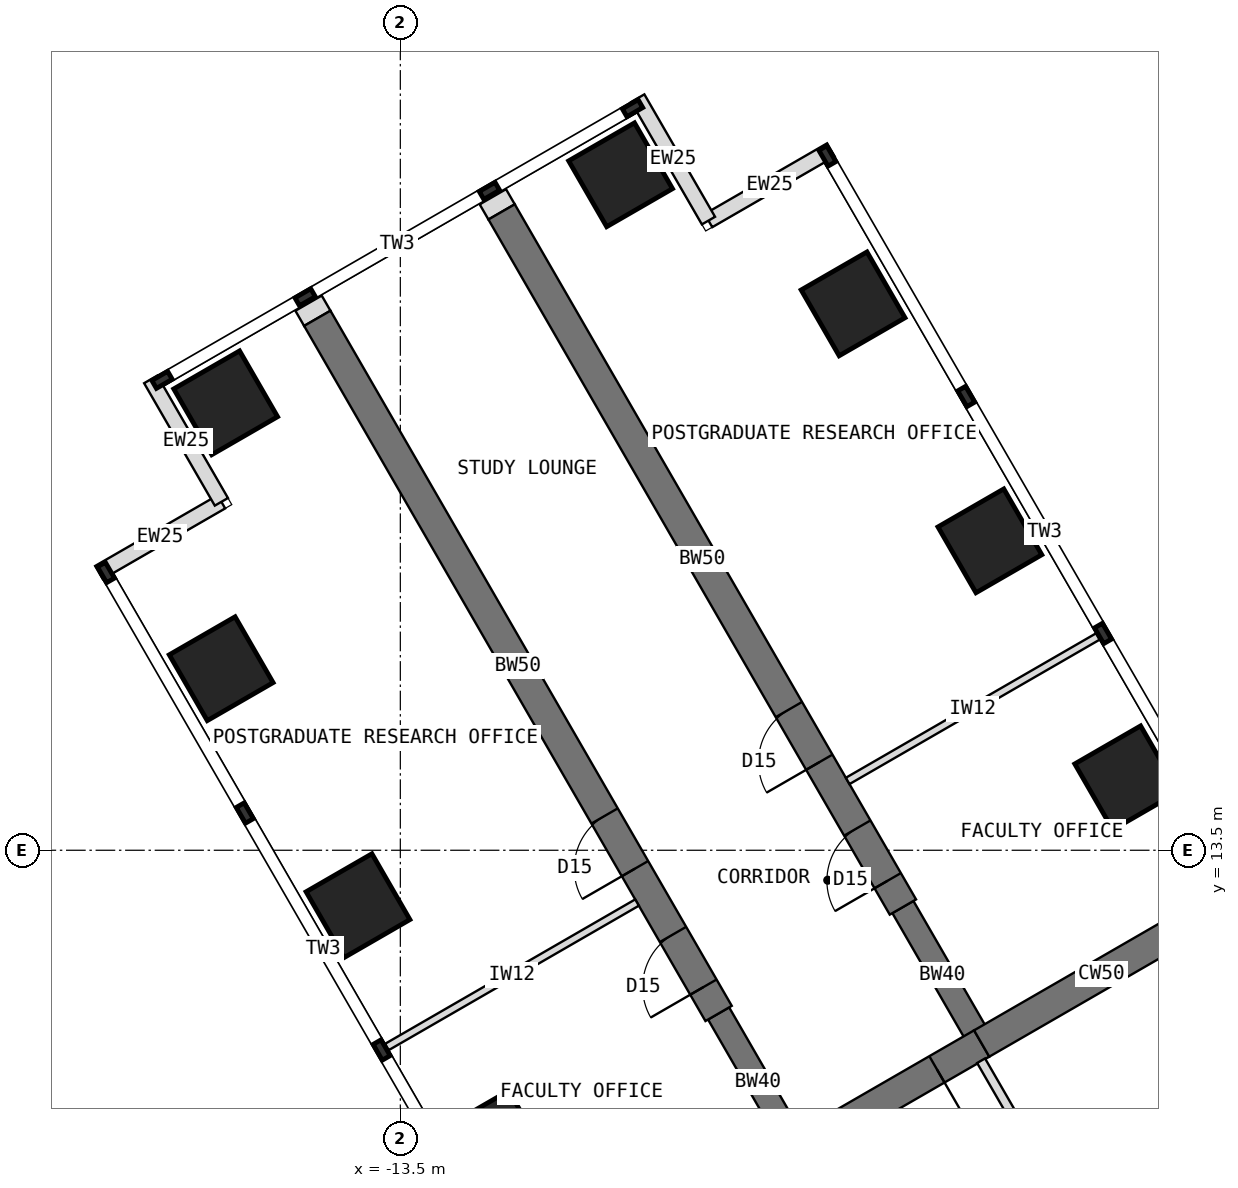
"""IFC4 building model, lengths in metres.
Left out: names, types, materials, properties, quantities, classifications, styles, units other than length and angle.
Written with IfcOpenShell. Run it as: python <this file> out.ifc"""

import sys

from ifc_helpers import new_model, si_unit, direction, frame, frame_2d, origin, origin_2d, place, context, subcontext, project, spatial, rectangle, extrude, element, fill, save


model = new_model("IFC4")
c1 = context("Model", 3, precision=1e-05, world=origin(), true_north=direction((0.0, 1.0)))
c2 = subcontext(c1, "Body", "Model", "MODEL_VIEW")
j1 = project(units=[si_unit("LENGTHUNIT", "METRE"), si_unit("PLANEANGLEUNIT", "RADIAN")], contexts=[c1])
p1 = place(None, origin())
s1 = spatial("IfcSite", under=j1, at=p1, CompositionType="ELEMENT")
p2 = place(p1, origin())
s2 = spatial("IfcBuilding", under=s1, at=p2, CompositionType="ELEMENT")
p3 = place(p2, frame((0.0, 0.0, 170.5)))
s3 = spatial("IfcBuildingStorey", under=s2, at=p3, CompositionType="ELEMENT", Elevation=170.5)
p4 = place(p3, frame((0.0, 12.596, 0.0), z_axis=(0.0, 0.0, 1.0), x_axis=(-0.866011268655, -0.500024481964, 0.0)))
e1 = element("IfcWall", 1, at=p4, inside=s3, PredefinedType="SHEAR", context=c2, shape_type="SweptSolid", body=[
    extrude(rectangle(XDim=4.548, YDim=0.5, at=frame_2d((2.274, 0.0))), origin(), (0.0, 0.0, 1.0), 4.0),
])
p5 = place(p3, frame((-3.939, 10.322, 0.0), z_axis=(0.0, 0.0, 1.0), x_axis=(-0.866019471182, -0.500010275428, 0.0)))
e2 = element("IfcWall", 2, at=p5, inside=s3, PredefinedType="SHEAR", context=c2, shape_type="SweptSolid", body=[
    extrude(rectangle(XDim=3.5, YDim=0.5, at=frame_2d((1.75, 0.0))), origin(), (0.0, 0.0, 1.0), 4.0),
])
p6 = place(p5, frame((0.85, 0.0, 0.0)))
e3 = element("IfcOpeningElement", 3, at=p6, cuts=e2, PredefinedType="OPENING", context=c2, shape_type="SweptSolid", body=[
    extrude(rectangle(XDim=1.8, YDim=2.1, at=frame_2d((0.9, 1.05))), frame((0.0, 0.26, 0.0), z_axis=(0.0, -1.0, 0.0), x_axis=(1.0, 0.0, 0.0)), (0.0, 0.0, 1.0), 0.52),
])
p7 = place(p3, frame((-6.97, 8.572, 0.0), z_axis=(0.0, 0.0, 1.0), x_axis=(-0.499988811324, 0.866031863473, 0.0)))
e4 = element("IfcWall", 4, at=p7, inside=s3, PredefinedType="SHEAR", context=c2, shape_type="SweptSolid", body=[
    extrude(rectangle(XDim=2.592, YDim=0.4, at=frame_2d((1.296, 0.0))), origin(), (0.0, 0.0, 1.0), 4.0),
])
p8 = place(p3, frame((-8.266, 10.816, 0.0), z_axis=(0.0, 0.0, 1.0), x_axis=(-0.499996231654, 0.866027579429, 0.0)))
e5 = element("IfcWall", 5, at=p8, inside=s3, PredefinedType="SHEAR", context=c2, shape_type="SweptSolid", body=[
    extrude(rectangle(XDim=13.2, YDim=0.5, at=frame_2d((6.6, 0.0))), origin(), (0.0, 0.0, 1.0), 4.0),
])
p9 = place(p8, frame((0.5, 0.0, 0.0)))
e6 = element("IfcOpeningElement", 6, at=p9, cuts=e5, PredefinedType="OPENING", context=c2, shape_type="SweptSolid", body=[
    extrude(rectangle(XDim=1.0, YDim=2.1, at=frame_2d((0.5, 1.05))), frame((0.0, 0.26, 0.0), z_axis=(0.0, -1.0, 0.0), x_axis=(1.0, 0.0, 0.0)), (0.0, 0.0, 1.0), 0.52),
])
p10 = place(p8, frame((2.75, 0.0, 0.0)))
e7 = element("IfcOpeningElement", 7, at=p10, cuts=e5, PredefinedType="OPENING", context=c2, shape_type="SweptSolid", body=[
    extrude(rectangle(XDim=1.0, YDim=2.1, at=frame_2d((0.5, 1.05))), frame((0.0, 0.26, 0.0), z_axis=(0.0, -1.0, 0.0), x_axis=(1.0, 0.0, 0.0)), (0.0, 0.0, 1.0), 0.52),
])
p11 = place(p3, frame((-3.939, 10.322, 0.0), z_axis=(0.0, 0.0, 1.0), x_axis=(-0.499918158782, 0.866072649678, 0.0)))
e8 = element("IfcWall", 8, at=p11, inside=s3, PredefinedType="SHEAR", context=c2, shape_type="SweptSolid", body=[
    extrude(rectangle(XDim=2.592, YDim=0.4, at=frame_2d((1.296, 0.0))), origin(), (0.0, 0.0, 1.0), 4.0),
])
p12 = place(p3, frame((-5.234, 12.566, 0.0), z_axis=(0.0, 0.0, 1.0), x_axis=(-0.500010103361, 0.866019570528, 0.0)))
e9 = element("IfcWall", 9, at=p12, inside=s3, PredefinedType="SHEAR", context=c2, shape_type="SweptSolid", body=[
    extrude(rectangle(XDim=13.2, YDim=0.5, at=frame_2d((6.6, 0.0))), origin(), (0.0, 0.0, 1.0), 4.0),
])
p13 = place(p12, frame((0.5, 0.0, 0.0)))
e10 = element("IfcOpeningElement", 10, at=p13, cuts=e9, PredefinedType="OPENING", context=c2, shape_type="SweptSolid", body=[
    extrude(rectangle(XDim=1.0, YDim=2.1, at=frame_2d((0.5, 1.05))), frame((0.0, 0.26, 0.0), z_axis=(0.0, -1.0, 0.0), x_axis=(1.0, 0.0, 0.0)), (0.0, 0.0, 1.0), 0.52),
])
p14 = place(p12, frame((2.75, 0.0, 0.0)))
e11 = element("IfcOpeningElement", 11, at=p14, cuts=e9, PredefinedType="OPENING", context=c2, shape_type="SweptSolid", body=[
    extrude(rectangle(XDim=1.0, YDim=2.1, at=frame_2d((0.5, 1.05))), frame((0.0, 0.26, 0.0), z_axis=(0.0, -1.0, 0.0), x_axis=(1.0, 0.0, 0.0)), (0.0, 0.0, 1.0), 0.52),
])
for number, where, z_axis, x_axis in (
    (12, (-11.946, 8.691, 0.0), (0.0, 0.0, 1.0), (0.866, 0.5, 0.0)),
    (13, (-1.554, 14.691, 0.0), (0.0, 0.0, 1.0), (0.866, 0.5, 0.0)),
    (14, (-14.196, 12.588, 0.0), (0.0, 0.0, 1.0), (0.866, 0.5, 0.0)),
    (15, (-3.804, 18.588, 0.0), (0.0, 0.0, 1.0), (0.866, 0.5, 0.0)),
    (16, (-16.446, 16.486, 0.0), (0.0, 0.0, 1.0), (0.866, 0.5, 0.0)),
    (17, (-6.054, 22.486, 0.0), (0.0, 0.0, 1.0), (0.866, 0.5, 0.0)),
    (18, (-16.373, 20.858, 0.0), (0.0, 0.0, 1.0), (0.866, 0.5, 0.0)),
    (19, (-9.877, 24.608, 0.0), (0.0, 0.0, 1.0), (0.866, 0.5, 0.0)),
):
    element("IfcColumn", number, at=place(p3, frame(where, z_axis=z_axis, x_axis=x_axis)), inside=s3, PredefinedType="COLUMN", context=c2, shape_type="SweptSolid", body=[
        extrude(rectangle(XDim=1.25, YDim=1.25, at=origin_2d()), origin(), (0.0, 0.0, 1.0), 4.0),
    ])
for number, where, z_axis, x_axis in (
    (20, (-18.456, 18.067, 0.0), (0.0, 0.0, 1.0), (0.866, 0.5, 0.0)),
    (21, (-16.443, 19.23, 0.0), (0.0, 0.0, 1.0), (-0.5, 0.866, 0.0)),
    (22, (-6.419, 25.017, 0.0), (0.0, 0.0, 1.0), (-0.866, -0.5, 0.0)),
    (23, (-8.432, 23.855, 0.0), (0.0, 0.0, 1.0), (-0.5, 0.866, 0.0)),
):
    element("IfcWall", number, at=place(p3, frame(where, z_axis=z_axis, x_axis=x_axis)), inside=s3, PredefinedType="STANDARD", context=c2, shape_type="SweptSolid", body=[
        extrude(rectangle(XDim=2.325, YDim=0.25, at=frame_2d((1.163, 0.0))), origin(), (0.0, 0.0, 1.0), 3.8),
    ])
for number, where, z_axis, x_axis in (
    (24, (-14.865, 22.248, 0.0), (0.0, 0.0, 1.0), (-0.5, 0.866, 0.0)),
    (25, (-11.834, 23.998, 0.0), (0.0, 0.0, 1.0), (-0.5, 0.866, 0.0)),
):
    element("IfcWall", number, at=place(p3, frame(where, z_axis=z_axis, x_axis=x_axis)), inside=s3, PredefinedType="PARTITIONING", context=c2, shape_type="SweptSolid", body=[
        extrude(rectangle(XDim=0.288, YDim=0.5, at=frame_2d((0.144, 0.0))), origin(), (0.0, 0.0, 1.0), 3.8),
    ])
p15 = place(p3, frame((-1.201, 6.12, 0.0), z_axis=(0.0, 0.0, 1.0), x_axis=(0.500021575205, 0.866012946976, 0.0)))
e26 = element("IfcWall", 26, at=p15, inside=s3, PredefinedType="SHEAR", context=c2, shape_type="SweptSolid", body=[
    extrude(rectangle(XDim=5.958, YDim=0.4, at=frame_2d((2.979, 0.0))), origin(), (0.0, 0.0, 1.0), 4.0),
])
for number, where, z_axis, x_axis in (
    (27, (-9.607, 12.64, 0.0), (0.0, 0.0, 1.0), (-0.866, -0.5, 0.0)),
    (28, (-6.143, 14.64, 0.0), (0.0, 0.0, 1.0), (0.866, 0.5, 0.0)),
):
    element("IfcWall", number, at=place(p3, frame(where, z_axis=z_axis, x_axis=x_axis)), inside=s3, PredefinedType="PARTITIONING", context=c2, shape_type="SweptSolid", body=[
        extrude(rectangle(XDim=4.75, YDim=0.12, at=frame_2d((2.375, 0.0))), origin(), (0.0, 0.0, 1.0), 3.8),
    ])
p16 = place(p3, frame((-3.948, 10.039, 0.0), z_axis=(0.0, 0.0, 1.0), x_axis=(0.500022258742, -0.866012552312, 0.0)))
e29 = element("IfcWall", 29, at=p16, inside=s3, PredefinedType="PARTITIONING", context=c2, shape_type="SweptSolid", body=[
    extrude(rectangle(XDim=5.146, YDim=0.15, at=frame_2d((2.573, 0.0))), origin(), (0.0, 0.0, 1.0), 3.8),
])
p17 = place(p16, frame((3.088, 0.0, 0.0)))
e30 = element("IfcOpeningElement", 30, at=p17, cuts=e29, PredefinedType="OPENING", context=c2, shape_type="SweptSolid", body=[
    extrude(rectangle(XDim=1.0, YDim=2.1, at=frame_2d((0.5, 1.05))), frame((0.0, 0.085, 0.0), z_axis=(0.0, -1.0, 0.0), x_axis=(1.0, 0.0, 0.0)), (0.0, 0.0, 1.0), 0.17),
])
p18 = place(p6, origin())
e31 = element("IfcDoor", 31, at=p18, inside=s3, OperationType="DOUBLE_DOOR_DOUBLE_SWING", PredefinedType="DOOR", context=c2, shape_type="SweptSolid", body=[
    extrude(rectangle(XDim=1.8, YDim=2.1, at=frame_2d((0.9, 1.05))), frame((0.0, 0.025, 0.0), z_axis=(0.0, -1.0, 0.0), x_axis=(1.0, 0.0, 0.0)), (0.0, 0.0, 1.0), 0.05),
])
fill(e3, e31)
p19 = place(p9, origin())
e32 = element("IfcDoor", 32, at=p19, inside=s3, OperationType="SINGLE_SWING_LEFT", PredefinedType="DOOR", context=c2, shape_type="SweptSolid", body=[
    extrude(rectangle(XDim=1.0, YDim=2.1, at=frame_2d((0.5, 1.05))), frame((0.0, 0.025, 0.0), z_axis=(0.0, -1.0, 0.0), x_axis=(1.0, 0.0, 0.0)), (0.0, 0.0, 1.0), 0.05),
])
fill(e6, e32)
p20 = place(p10, origin())
e33 = element("IfcDoor", 33, at=p20, inside=s3, OperationType="SINGLE_SWING_LEFT", PredefinedType="DOOR", context=c2, shape_type="SweptSolid", body=[
    extrude(rectangle(XDim=1.0, YDim=2.1, at=frame_2d((0.5, 1.05))), frame((0.0, 0.025, 0.0), z_axis=(0.0, -1.0, 0.0), x_axis=(1.0, 0.0, 0.0)), (0.0, 0.0, 1.0), 0.05),
])
fill(e7, e33)
p21 = place(p13, origin())
e34 = element("IfcDoor", 34, at=p21, inside=s3, OperationType="SINGLE_SWING_LEFT", PredefinedType="DOOR", context=c2, shape_type="SweptSolid", body=[
    extrude(rectangle(XDim=1.0, YDim=2.1, at=frame_2d((0.5, 1.05))), frame((0.0, 0.025, 0.0), z_axis=(0.0, -1.0, 0.0), x_axis=(1.0, 0.0, 0.0)), (0.0, 0.0, 1.0), 0.05),
])
fill(e10, e34)
p22 = place(p14, origin())
e35 = element("IfcDoor", 35, at=p22, inside=s3, OperationType="SINGLE_SWING_LEFT", PredefinedType="DOOR", context=c2, shape_type="SweptSolid", body=[
    extrude(rectangle(XDim=1.0, YDim=2.1, at=frame_2d((0.5, 1.05))), frame((0.0, 0.025, 0.0), z_axis=(0.0, -1.0, 0.0), x_axis=(1.0, 0.0, 0.0)), (0.0, 0.0, 1.0), 0.05),
])
fill(e11, e35)
save(model, sys.argv[1])
